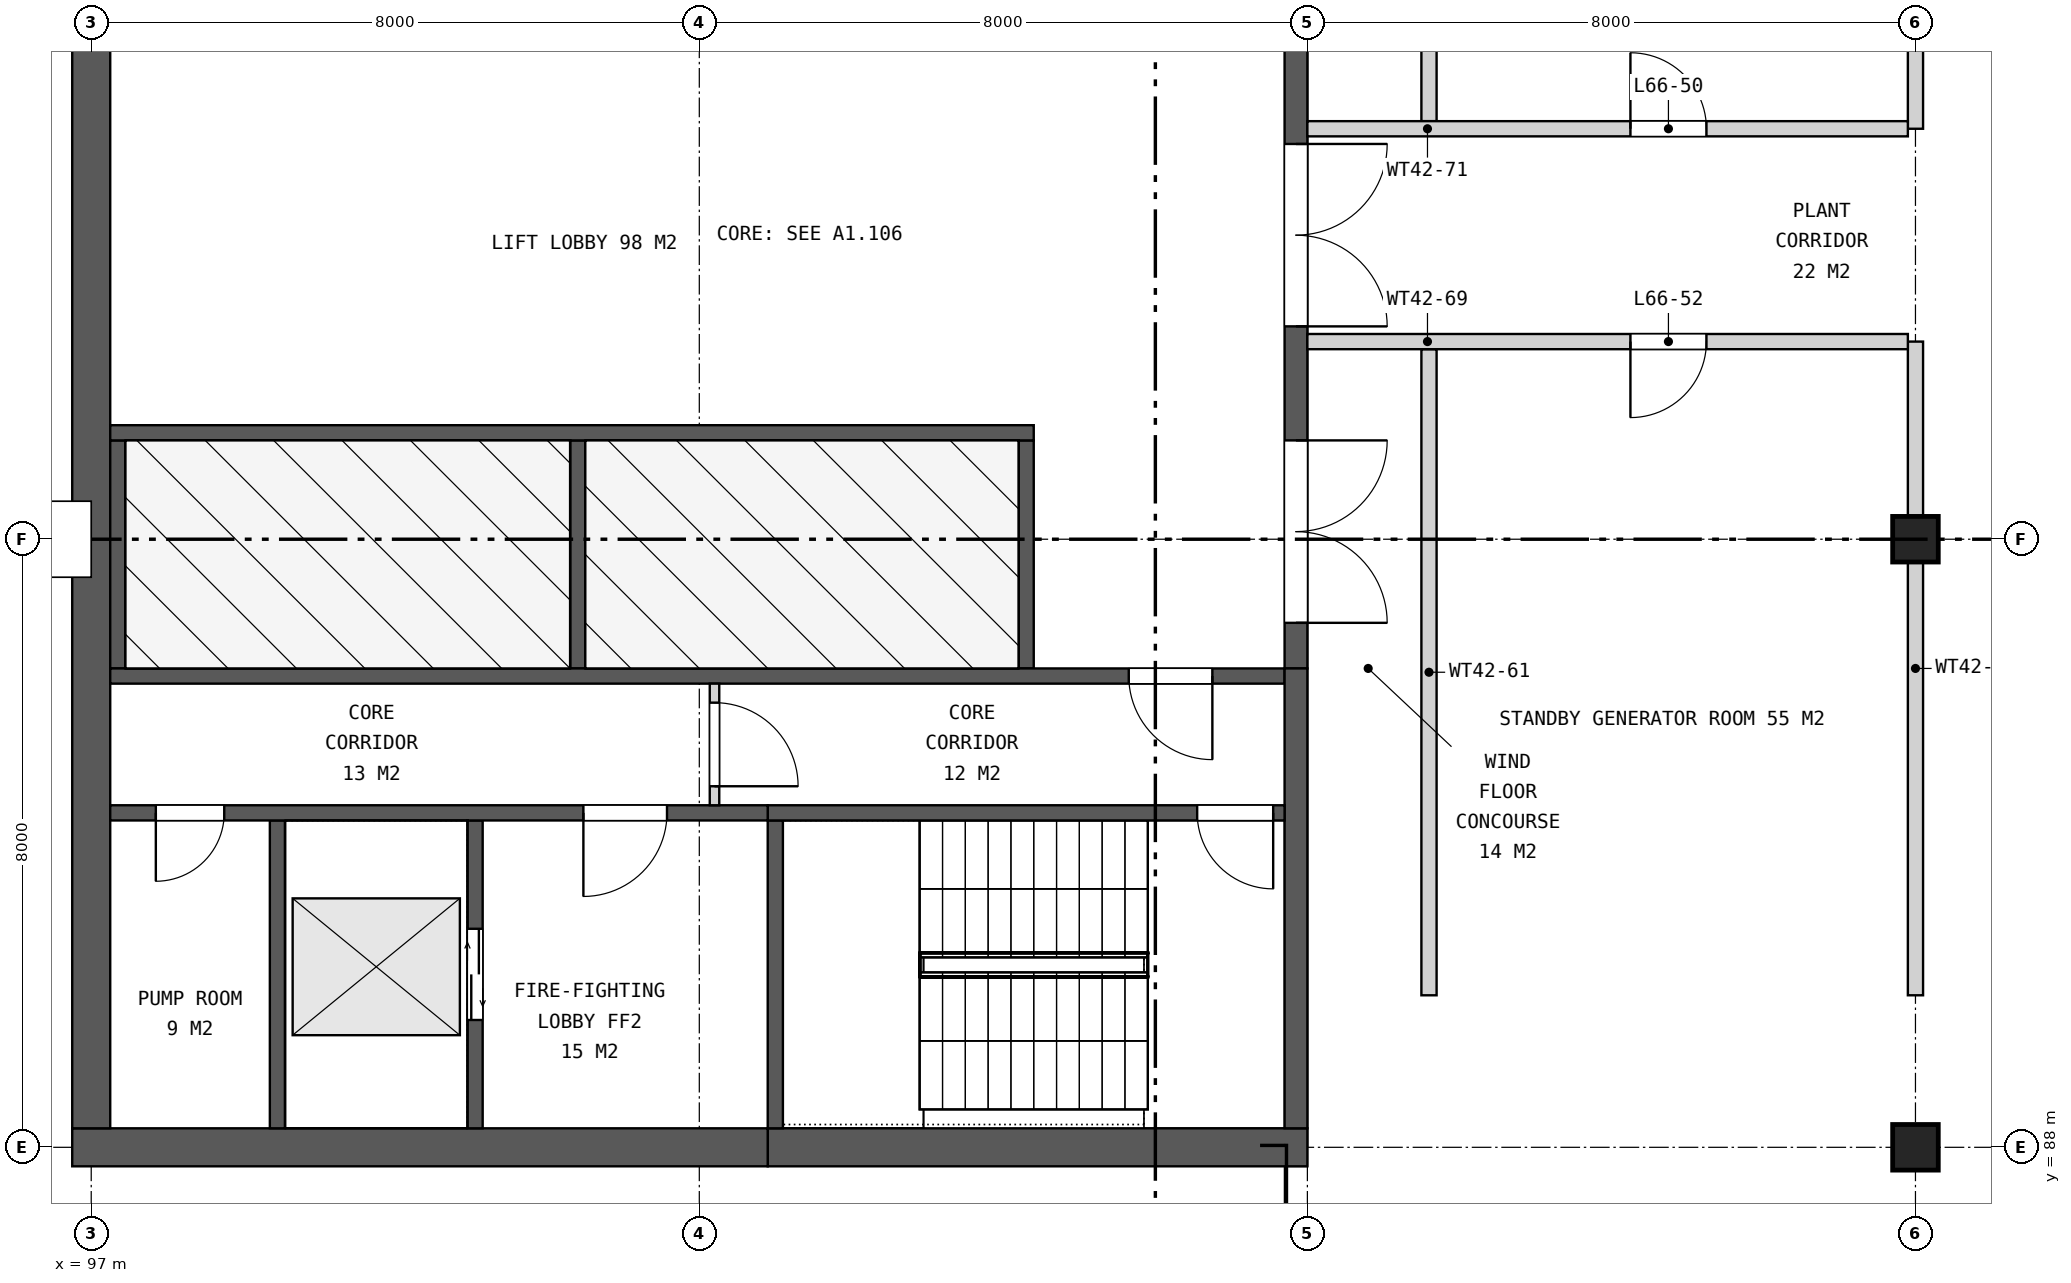
"""IFC4 building model, lengths in metres.
Left out: names, types, materials, properties, quantities, classifications, styles, units other than length and angle.
Written with IfcOpenShell. Run it as: python <this file> out.ifc"""

import sys

from ifc_helpers import new_model, si_unit, direction, frame, frame_2d, origin, origin_2d, place, context, subcontext, project, spatial, rectangle, extrude, element, fill, save


model = new_model("IFC4")
c1 = context("Model", 3, precision=1e-05, world=origin(), true_north=direction((0.0, 1.0)))
c2 = subcontext(c1, "Body", "Model", "MODEL_VIEW")
j1 = project(units=[si_unit("LENGTHUNIT", "METRE"), si_unit("PLANEANGLEUNIT", "RADIAN")], contexts=[c1])
p1 = place(None, origin())
s1 = spatial("IfcSite", under=j1, at=p1, CompositionType="ELEMENT")
p2 = place(p1, origin())
s2 = spatial("IfcBuilding", under=s1, at=p2, CompositionType="ELEMENT")
p3 = place(p2, frame((0.0, 0.0, 303.9)))
s3 = spatial("IfcBuildingStorey", under=s2, at=p3, CompositionType="ELEMENT", Elevation=303.9)
for number, where, z_axis, x_axis in (
    (1, (121.0, 88.0, 0.0), (0.0, 0.0, 1.0), (1.0, 0.0, 0.0)),
    (2, (121.0, 96.0, 0.0), (0.0, 0.0, 1.0), (1.0, 0.0, 0.0)),
):
    element("IfcColumn", number, at=place(p3, frame(where, z_axis=z_axis, x_axis=x_axis)), inside=s3, PredefinedType="COLUMN", context=c2, shape_type="SweptSolid", body=[
        extrude(rectangle(XDim=0.6, YDim=0.6, at=origin_2d()), origin(), (0.0, 0.0, 1.0), 7.4),
    ])
p4 = place(p3, frame((113.0, 88.0, 0.0), z_axis=(0.0, 0.0, 1.0), x_axis=(-1.0, 0.0, 0.0)))
e3 = element("IfcWall", 3, at=p4, inside=s3, PredefinedType="SHEAR", context=c2, shape_type="SweptSolid", body=[
    extrude(rectangle(XDim=7.1, YDim=0.5, at=frame_2d((3.55, 0.0))), origin(), (0.0, 0.0, 1.0), 7.4),
])
p5 = place(p3, frame((105.9, 88.0, 0.0), z_axis=(0.0, 0.0, 1.0), x_axis=(-1.0, 0.0, 0.0)))
e4 = element("IfcWall", 4, at=p5, inside=s3, PredefinedType="SHEAR", context=c2, shape_type="SweptSolid", body=[
    extrude(rectangle(XDim=9.15, YDim=0.5, at=frame_2d((4.575, 0.0))), origin(), (0.0, 0.0, 1.0), 7.4),
])
p6 = place(p3, frame((97.0, 111.75, 0.0), z_axis=(0.0, 0.0, 1.0), x_axis=(0.0, -1.0, 0.0)))
e5 = element("IfcWall", 5, at=p6, inside=s3, PredefinedType="SHEAR", context=c2, shape_type="SweptSolid", body=[
    extrude(rectangle(XDim=23.5, YDim=0.5, at=frame_2d((11.75, 0.0))), origin(), (0.0, 0.0, 1.0), 7.4),
])
p7 = place(p3, frame((112.85, 105.7, 0.0), z_axis=(0.0, 0.0, 1.0), x_axis=(0.0, -1.0, 0.0)))
e6 = element("IfcWall", 6, at=p7, inside=s3, PredefinedType="SHEAR", context=c2, shape_type="SweptSolid", body=[
    extrude(rectangle(XDim=11.4, YDim=0.3, at=frame_2d((5.7, 0.0))), origin(), (0.0, 0.0, 1.0), 7.4),
])
p8 = place(p7, frame((0.6, 0.0, 0.0)))
e7 = element("IfcOpeningElement", 7, at=p8, cuts=e6, PredefinedType="OPENING", context=c2, shape_type="SweptSolid", body=[
    extrude(rectangle(XDim=2.4, YDim=2.4, at=frame_2d((1.2, 1.2))), frame((0.0, 0.16, 0.0), z_axis=(0.0, -1.0, 0.0), x_axis=(1.0, 0.0, 0.0)), (0.0, 0.0, 1.0), 0.32),
])
p9 = place(p7, frame((4.5, 0.0, 0.0)))
e8 = element("IfcOpeningElement", 8, at=p9, cuts=e6, PredefinedType="OPENING", context=c2, shape_type="SweptSolid", body=[
    extrude(rectangle(XDim=2.4, YDim=2.4, at=frame_2d((1.2, 1.2))), frame((0.0, 0.16, 0.0), z_axis=(0.0, -1.0, 0.0), x_axis=(1.0, 0.0, 0.0)), (0.0, 0.0, 1.0), 0.32),
])
p10 = place(p7, frame((8.4, 0.0, 0.0)))
e9 = element("IfcOpeningElement", 9, at=p10, cuts=e6, PredefinedType="OPENING", context=c2, shape_type="SweptSolid", body=[
    extrude(rectangle(XDim=2.4, YDim=2.4, at=frame_2d((1.2, 1.2))), frame((0.0, 0.16, 0.0), z_axis=(0.0, -1.0, 0.0), x_axis=(1.0, 0.0, 0.0)), (0.0, 0.0, 1.0), 0.32),
])
for number, where, z_axis, x_axis in (
    (10, (109.3, 97.3, 0.0), (0.0, 0.0, 1.0), (0.0, -1.0, 0.0)),
    (11, (103.4, 97.3, 0.0), (0.0, 0.0, 1.0), (0.0, -1.0, 0.0)),
    (12, (97.35, 97.3, 0.0), (0.0, 0.0, 1.0), (0.0, -1.0, 0.0)),
):
    element("IfcWall", number, at=place(p3, frame(where, z_axis=z_axis, x_axis=x_axis)), inside=s3, PredefinedType="SHEAR", context=c2, shape_type="SweptSolid", body=[
        extrude(rectangle(XDim=3.0, YDim=0.2, at=frame_2d((1.5, 0.0))), origin(), (0.0, 0.0, 1.0), 7.4),
    ])
p11 = place(p3, frame((109.4, 97.4, 0.0), z_axis=(0.0, 0.0, 1.0), x_axis=(-1.0, 0.0, 0.0)))
e13 = element("IfcWall", 13, at=p11, inside=s3, PredefinedType="SHEAR", context=c2, shape_type="SweptSolid", body=[
    extrude(rectangle(XDim=12.15, YDim=0.2, at=frame_2d((6.075, 0.0))), origin(), (0.0, 0.0, 1.0), 7.4),
])
p12 = place(p3, frame((112.7, 94.2, 0.0), z_axis=(0.0, 0.0, 1.0), x_axis=(-1.0, 0.0, 0.0)))
e14 = element("IfcWall", 14, at=p12, inside=s3, PredefinedType="SHEAR", context=c2, shape_type="SweptSolid", body=[
    extrude(rectangle(XDim=15.45, YDim=0.2, at=frame_2d((7.725, 0.0))), origin(), (0.0, 0.0, 1.0), 7.4),
])
p13 = place(p12, frame((0.95, 0.0, 0.0)))
e15 = element("IfcOpeningElement", 15, at=p13, cuts=e14, PredefinedType="OPENING", context=c2, shape_type="SweptSolid", body=[
    extrude(rectangle(XDim=1.1, YDim=2.1, at=frame_2d((0.55, 1.05))), frame((0.0, 0.11, 0.0), z_axis=(0.0, -1.0, 0.0), x_axis=(1.0, 0.0, 0.0)), (0.0, 0.0, 1.0), 0.22),
])
p14 = place(p3, frame((112.85, 94.3, 0.0), z_axis=(0.0, 0.0, 1.0), x_axis=(0.0, -1.0, 0.0)))
e16 = element("IfcWall", 16, at=p14, inside=s3, PredefinedType="SHEAR", context=c2, shape_type="SweptSolid", body=[
    extrude(rectangle(XDim=6.05, YDim=0.3, at=frame_2d((3.025, 0.0))), origin(), (0.0, 0.0, 1.0), 7.4),
])
p15 = place(p3, frame((106.0, 92.3, 0.0), z_axis=(0.0, 0.0, 1.0), x_axis=(0.0, -1.0, 0.0)))
e17 = element("IfcWall", 17, at=p15, inside=s3, PredefinedType="SHEAR", context=c2, shape_type="SweptSolid", body=[
    extrude(rectangle(XDim=4.05, YDim=0.2, at=frame_2d((2.025, 0.0))), origin(), (0.0, 0.0, 1.0), 7.4),
])
p16 = place(p3, frame((102.05, 92.3, 0.0), z_axis=(0.0, 0.0, 1.0), x_axis=(0.0, -1.0, 0.0)))
e18 = element("IfcWall", 18, at=p16, inside=s3, PredefinedType="SHEAR", context=c2, shape_type="SweptSolid", body=[
    extrude(rectangle(XDim=4.05, YDim=0.2, at=frame_2d((2.025, 0.0))), origin(), (0.0, 0.0, 1.0), 7.4),
])
p17 = place(p16, frame((1.425, 0.0, 0.0)))
e19 = element("IfcOpeningElement", 19, at=p17, cuts=e18, PredefinedType="OPENING", context=c2, shape_type="SweptSolid", body=[
    extrude(rectangle(XDim=1.2, YDim=2.1, at=frame_2d((0.6, 1.05))), frame((0.0, 0.11, 0.0), z_axis=(0.0, -1.0, 0.0), x_axis=(1.0, 0.0, 0.0)), (0.0, 0.0, 1.0), 0.22),
])
p18 = place(p3, frame((99.45, 92.3, 0.0), z_axis=(0.0, 0.0, 1.0), x_axis=(0.0, -1.0, 0.0)))
e20 = element("IfcWall", 20, at=p18, inside=s3, PredefinedType="SHEAR", context=c2, shape_type="SweptSolid", body=[
    extrude(rectangle(XDim=4.05, YDim=0.2, at=frame_2d((2.025, 0.0))), origin(), (0.0, 0.0, 1.0), 7.4),
])
p19 = place(p3, frame((112.7, 92.4, 0.0), z_axis=(0.0, 0.0, 1.0), x_axis=(-1.0, 0.0, 0.0)))
e21 = element("IfcWall", 21, at=p19, inside=s3, PredefinedType="SHEAR", context=c2, shape_type="SweptSolid", body=[
    extrude(rectangle(XDim=6.8, YDim=0.2, at=frame_2d((3.4, 0.0))), origin(), (0.0, 0.0, 1.0), 7.4),
])
p20 = place(p19, frame((0.15, 0.0, 0.0)))
e22 = element("IfcOpeningElement", 22, at=p20, cuts=e21, PredefinedType="OPENING", context=c2, shape_type="SweptSolid", body=[
    extrude(rectangle(XDim=1.0, YDim=2.1, at=frame_2d((0.5, 1.05))), frame((0.0, 0.11, 0.0), z_axis=(0.0, -1.0, 0.0), x_axis=(1.0, 0.0, 0.0)), (0.0, 0.0, 1.0), 0.22),
])
p21 = place(p3, frame((105.9, 92.4, 0.0), z_axis=(0.0, 0.0, 1.0), x_axis=(-1.0, 0.0, 0.0)))
e23 = element("IfcWall", 23, at=p21, inside=s3, PredefinedType="SHEAR", context=c2, shape_type="SweptSolid", body=[
    extrude(rectangle(XDim=8.65, YDim=0.2, at=frame_2d((4.325, 0.0))), origin(), (0.0, 0.0, 1.0), 7.4),
])
p22 = place(p21, frame((1.325, 0.0, 0.0)))
e24 = element("IfcOpeningElement", 24, at=p22, cuts=e23, PredefinedType="OPENING", context=c2, shape_type="SweptSolid", body=[
    extrude(rectangle(XDim=1.1, YDim=2.1, at=frame_2d((0.55, 1.05))), frame((0.0, 0.11, 0.0), z_axis=(0.0, -1.0, 0.0), x_axis=(1.0, 0.0, 0.0)), (0.0, 0.0, 1.0), 0.22),
])
p23 = place(p21, frame((7.15, 0.0, 0.0)))
e25 = element("IfcOpeningElement", 25, at=p23, cuts=e23, PredefinedType="OPENING", context=c2, shape_type="SweptSolid", body=[
    extrude(rectangle(XDim=0.9, YDim=2.1, at=frame_2d((0.45, 1.05))), frame((0.0, 0.11, 0.0), z_axis=(0.0, -1.0, 0.0), x_axis=(1.0, 0.0, 0.0)), (0.0, 0.0, 1.0), 0.22),
])
p24 = place(p3, frame((105.2, 94.1, 0.0), z_axis=(0.0, 0.0, 1.0), x_axis=(0.0, -1.0, 0.0)))
e26 = element("IfcWall", 26, at=p24, inside=s3, PredefinedType="PARTITIONING", context=c2, shape_type="SweptSolid", body=[
    extrude(rectangle(XDim=1.6, YDim=0.125, at=frame_2d((0.8, 0.0))), origin(), (0.0, 0.0, 1.0), 7.4),
])
p25 = place(p24, frame((0.25, 0.0, 0.0)))
e27 = element("IfcOpeningElement", 27, at=p25, cuts=e26, PredefinedType="OPENING", context=c2, shape_type="SweptSolid", body=[
    extrude(rectangle(XDim=1.1, YDim=2.1, at=frame_2d((0.55, 1.05))), frame((0.0, 0.073, 0.0), z_axis=(0.0, -1.0, 0.0), x_axis=(1.0, 0.0, 0.0)), (0.0, 0.0, 1.0), 0.145),
])
for number, where, z_axis, x_axis in (
    (28, (114.6, 90.0, 0.0), (0.0, 0.0, 1.0), (0.0, 1.0, 0.0)),
    (29, (114.6, 101.5, 0.0), (0.0, 0.0, 1.0), (0.0, 1.0, 0.0)),
):
    element("IfcWall", number, at=place(p3, frame(where, z_axis=z_axis, x_axis=x_axis)), inside=s3, PredefinedType="SOLIDWALL", context=c2, shape_type="SweptSolid", body=[
        extrude(rectangle(XDim=8.5, YDim=0.2, at=frame_2d((4.25, 0.0))), origin(), (0.0, 0.0, 1.0), 6.643),
    ])
for number, where, z_axis, x_axis in (
    (30, (121.0, 90.0, 0.0), (0.0, 0.0, 1.0), (0.0, 1.0, 0.0)),
    (31, (121.0, 101.4, 0.0), (0.0, 0.0, 1.0), (0.0, 1.0, 0.0)),
):
    element("IfcWall", number, at=place(p3, frame(where, z_axis=z_axis, x_axis=x_axis)), inside=s3, PredefinedType="SOLIDWALL", context=c2, shape_type="SweptSolid", body=[
        extrude(rectangle(XDim=8.6, YDim=0.2, at=frame_2d((4.3, 0.0))), origin(), (0.0, 0.0, 1.0), 6.643),
    ])
p26 = place(p3, frame((113.0, 98.6, 0.0), z_axis=(0.0, 0.0, 1.0), x_axis=(1.0, 0.0, 0.0)))
e32 = element("IfcWall", 32, at=p26, inside=s3, PredefinedType="SOLIDWALL", context=c2, shape_type="SweptSolid", body=[
    extrude(rectangle(XDim=7.9, YDim=0.2, at=frame_2d((3.95, 0.0))), origin(), (0.0, 0.0, 1.0), 6.643),
])
p27 = place(p26, frame((4.25, 0.0, 0.0)))
e33 = element("IfcOpeningElement", 33, at=p27, cuts=e32, PredefinedType="OPENING", context=c2, shape_type="SweptSolid", body=[
    extrude(rectangle(XDim=1.0, YDim=2.1, at=frame_2d((0.5, 1.05))), frame((0.0, 0.11, 0.0), z_axis=(0.0, -1.0, 0.0), x_axis=(1.0, 0.0, 0.0)), (0.0, 0.0, 1.0), 0.22),
])
p28 = place(p3, frame((113.0, 101.4, 0.0), z_axis=(0.0, 0.0, 1.0), x_axis=(1.0, 0.0, 0.0)))
e34 = element("IfcWall", 34, at=p28, inside=s3, PredefinedType="SOLIDWALL", context=c2, shape_type="SweptSolid", body=[
    extrude(rectangle(XDim=7.9, YDim=0.2, at=frame_2d((3.95, 0.0))), origin(), (0.0, 0.0, 1.0), 6.643),
])
p29 = place(p28, frame((4.25, 0.0, 0.0)))
e35 = element("IfcOpeningElement", 35, at=p29, cuts=e34, PredefinedType="OPENING", context=c2, shape_type="SweptSolid", body=[
    extrude(rectangle(XDim=1.0, YDim=2.1, at=frame_2d((0.5, 1.05))), frame((0.0, 0.11, 0.0), z_axis=(0.0, -1.0, 0.0), x_axis=(1.0, 0.0, 0.0)), (0.0, 0.0, 1.0), 0.22),
])
p30 = place(p9, origin())
e36 = element("IfcDoor", 36, at=p30, inside=s3, OperationType="DOUBLE_DOOR_SINGLE_SWING", PredefinedType="DOOR", context=c2, shape_type="SweptSolid", body=[
    extrude(rectangle(XDim=2.4, YDim=2.4, at=frame_2d((1.2, 1.2))), frame((0.0, 0.025, 0.0), z_axis=(0.0, -1.0, 0.0), x_axis=(1.0, 0.0, 0.0)), (0.0, 0.0, 1.0), 0.05),
])
fill(e8, e36)
p31 = place(p10, origin())
e37 = element("IfcDoor", 37, at=p31, inside=s3, OperationType="DOUBLE_DOOR_SINGLE_SWING", PredefinedType="DOOR", context=c2, shape_type="SweptSolid", body=[
    extrude(rectangle(XDim=2.4, YDim=2.4, at=frame_2d((1.2, 1.2))), frame((0.0, 0.025, 0.0), z_axis=(0.0, -1.0, 0.0), x_axis=(1.0, 0.0, 0.0)), (0.0, 0.0, 1.0), 0.05),
])
fill(e9, e37)
p32 = place(p13, origin())
e38 = element("IfcDoor", 38, at=p32, inside=s3, OperationType="SINGLE_SWING_LEFT", PredefinedType="DOOR", context=c2, shape_type="SweptSolid", body=[
    extrude(rectangle(XDim=1.1, YDim=2.1, at=frame_2d((0.55, 1.05))), frame((0.0, 0.025, 0.0), z_axis=(0.0, -1.0, 0.0), x_axis=(1.0, 0.0, 0.0)), (0.0, 0.0, 1.0), 0.05),
])
fill(e15, e38)
p33 = place(p17, origin())
e39 = element("IfcDoor", 39, at=p33, inside=s3, OperationType="DOUBLE_DOOR_SLIDING", PredefinedType="DOOR", context=c2, shape_type="SweptSolid", body=[
    extrude(rectangle(XDim=1.2, YDim=2.1, at=frame_2d((0.6, 1.05))), frame((0.0, 0.025, 0.0), z_axis=(0.0, -1.0, 0.0), x_axis=(1.0, 0.0, 0.0)), (0.0, 0.0, 1.0), 0.05),
])
fill(e19, e39)
p34 = place(p20, origin())
e40 = element("IfcDoor", 40, at=p34, inside=s3, OperationType="SINGLE_SWING_LEFT", PredefinedType="DOOR", context=c2, shape_type="SweptSolid", body=[
    extrude(rectangle(XDim=1.0, YDim=2.1, at=frame_2d((0.5, 1.05))), frame((0.0, 0.025, 0.0), z_axis=(0.0, -1.0, 0.0), x_axis=(1.0, 0.0, 0.0)), (0.0, 0.0, 1.0), 0.05),
])
fill(e22, e40)
p35 = place(p22, origin())
e41 = element("IfcDoor", 41, at=p35, inside=s3, OperationType="SINGLE_SWING_RIGHT", PredefinedType="DOOR", context=c2, shape_type="SweptSolid", body=[
    extrude(rectangle(XDim=1.1, YDim=2.1, at=frame_2d((0.55, 1.05))), frame((0.0, 0.025, 0.0), z_axis=(0.0, -1.0, 0.0), x_axis=(1.0, 0.0, 0.0)), (0.0, 0.0, 1.0), 0.05),
])
fill(e24, e41)
p36 = place(p23, origin())
e42 = element("IfcDoor", 42, at=p36, inside=s3, OperationType="SINGLE_SWING_RIGHT", PredefinedType="DOOR", context=c2, shape_type="SweptSolid", body=[
    extrude(rectangle(XDim=0.9, YDim=2.1, at=frame_2d((0.45, 1.05))), frame((0.0, 0.025, 0.0), z_axis=(0.0, -1.0, 0.0), x_axis=(1.0, 0.0, 0.0)), (0.0, 0.0, 1.0), 0.05),
])
fill(e25, e42)
p37 = place(p25, origin())
e43 = element("IfcDoor", 43, at=p37, inside=s3, OperationType="SINGLE_SWING_RIGHT", PredefinedType="DOOR", context=c2, shape_type="SweptSolid", body=[
    extrude(rectangle(XDim=1.1, YDim=2.1, at=frame_2d((0.55, 1.05))), frame((0.0, 0.025, 0.0), z_axis=(0.0, -1.0, 0.0), x_axis=(1.0, 0.0, 0.0)), (0.0, 0.0, 1.0), 0.05),
])
fill(e27, e43)
p38 = place(p29, origin())
e44 = element("IfcDoor", 44, at=p38, inside=s3, OperationType="SINGLE_SWING_LEFT", PredefinedType="DOOR", context=c2, shape_type="SweptSolid", body=[
    extrude(rectangle(XDim=1.0, YDim=2.1, at=frame_2d((0.5, 1.05))), frame((0.0, 0.025, 0.0), z_axis=(0.0, -1.0, 0.0), x_axis=(1.0, 0.0, 0.0)), (0.0, 0.0, 1.0), 0.05),
])
fill(e35, e44)
p39 = place(p27, frame((1.0, 0.0, 0.0), z_axis=(0.0, 0.0, 1.0), x_axis=(-1.0, 0.0, 0.0)))
e45 = element("IfcDoor", 45, at=p39, inside=s3, OperationType="SINGLE_SWING_RIGHT", PredefinedType="DOOR", context=c2, shape_type="SweptSolid", body=[
    extrude(rectangle(XDim=1.0, YDim=2.1, at=frame_2d((0.5, 1.05))), frame((0.0, 0.025, 0.0), z_axis=(0.0, -1.0, 0.0), x_axis=(1.0, 0.0, 0.0)), (0.0, 0.0, 1.0), 0.05),
])
fill(e33, e45)
save(model, sys.argv[1])
